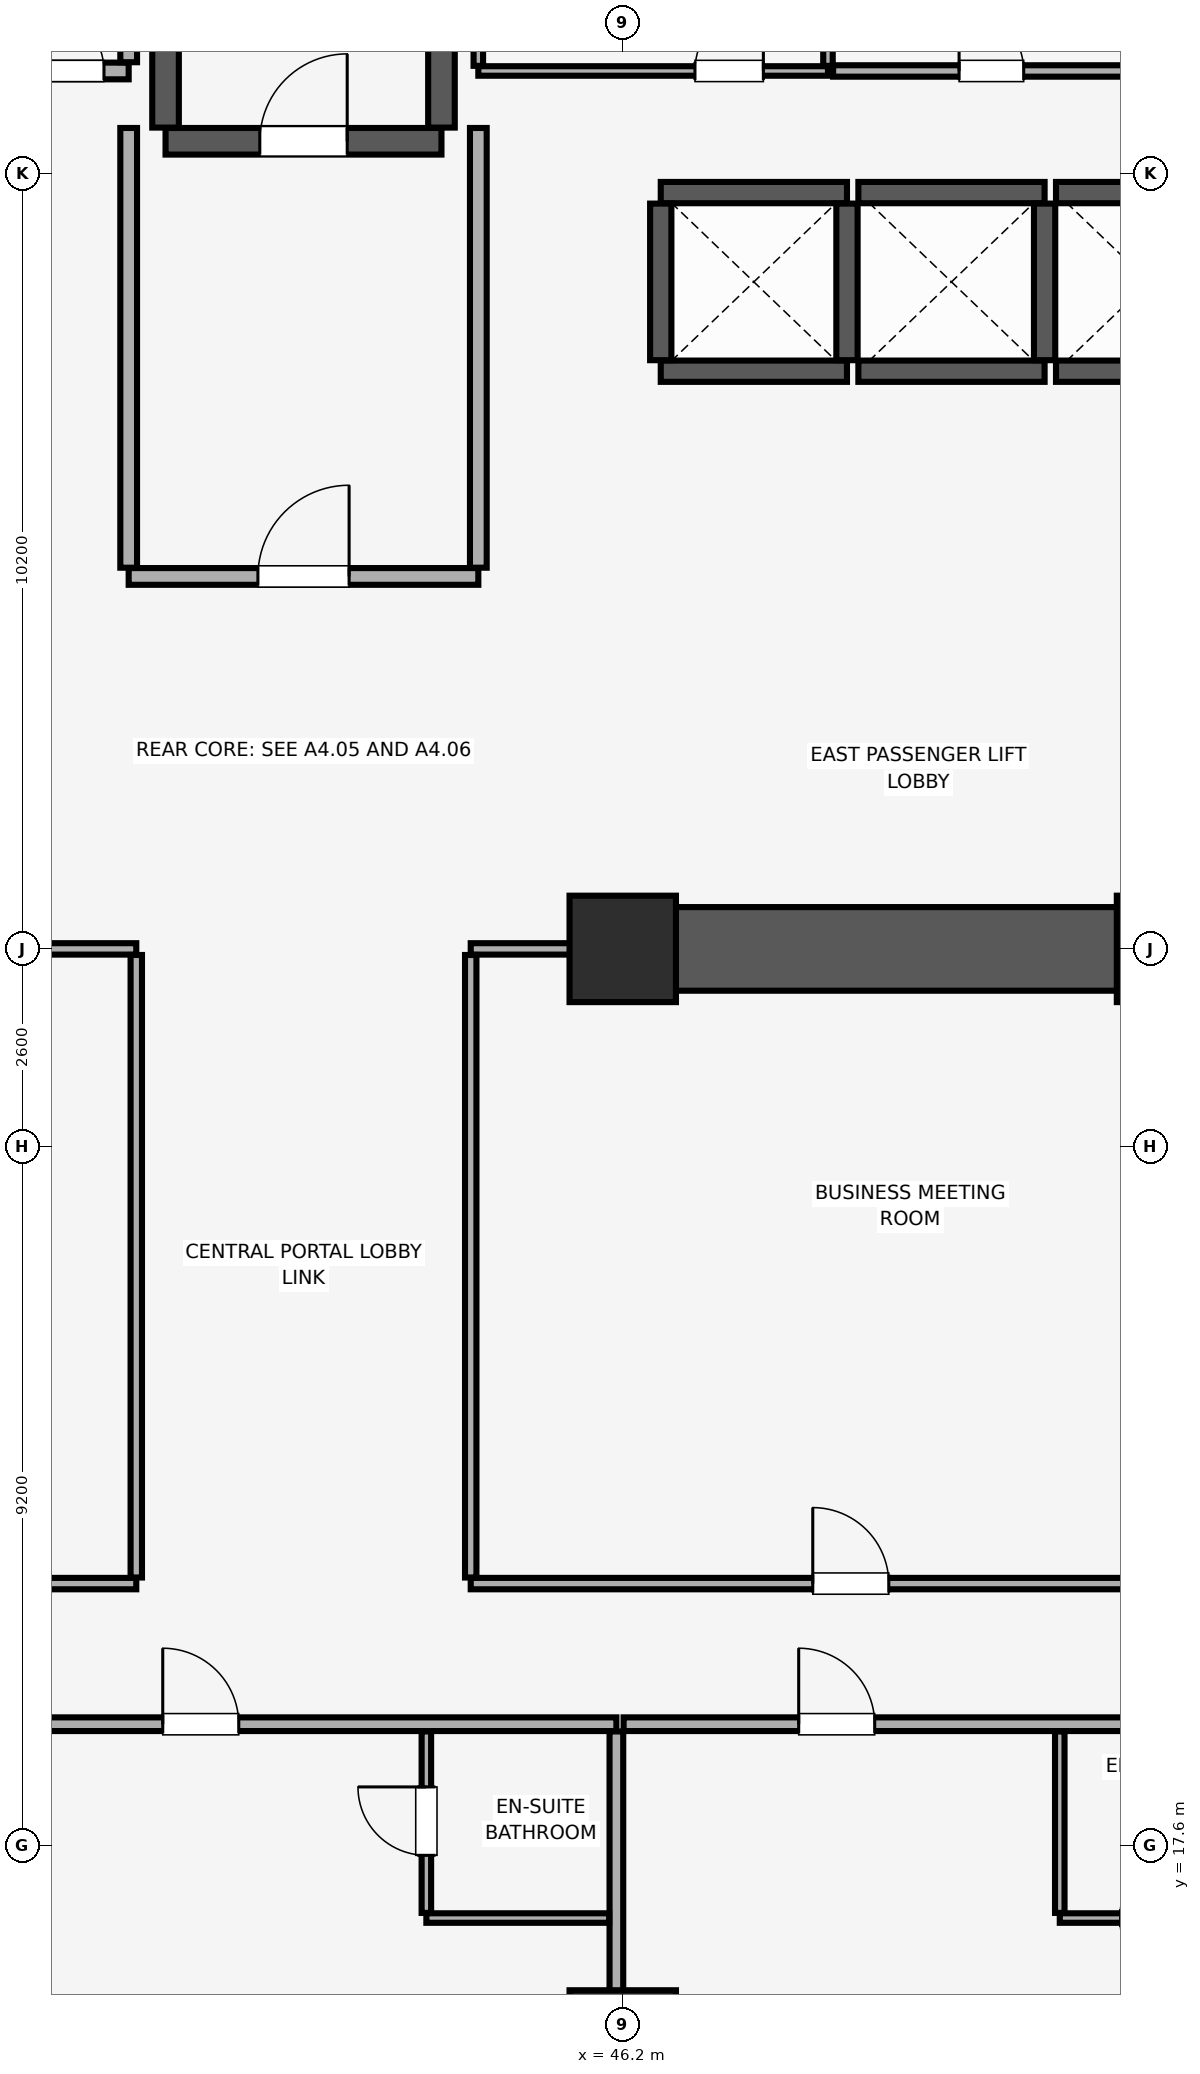
"""IFC4 building model, lengths in metres.
Left out: names, types, materials, properties, quantities, classifications, styles, units other than length and angle.
Written with IfcOpenShell. Run it as: python <this file> out.ifc"""

import sys

from ifc_helpers import new_model, si_unit, direction, frame, frame_2d, origin, origin_2d, place, context, subcontext, project, spatial, rectangle, extrude, element, fill, save


model = new_model("IFC4")
c1 = context("Model", 3, precision=1e-05, world=origin(), true_north=direction((0.0, 1.0)))
c2 = subcontext(c1, "Body", "Model", "MODEL_VIEW")
j1 = project(units=[si_unit("LENGTHUNIT", "METRE"), si_unit("PLANEANGLEUNIT", "RADIAN")], contexts=[c1])
p1 = place(None, origin())
s1 = spatial("IfcSite", under=j1, at=p1, CompositionType="ELEMENT")
p2 = place(p1, origin())
s2 = spatial("IfcBuilding", under=s1, at=p2, CompositionType="ELEMENT")
p3 = place(p2, frame((0.0, 0.0, 72.65)))
s3 = spatial("IfcBuildingStorey", under=s2, at=p3, CompositionType="ELEMENT", Elevation=72.65)
for number, where, z_axis, x_axis in (
    (1, (46.2, 15.0, 0.0), (0.0, 0.0, 1.0), (1.0, 0.0, 0.0)),
    (2, (46.2, 29.4, 0.0), (0.0, 0.0, 1.0), (1.0, 0.0, 0.0)),
    (3, (53.4, 29.4, 0.0), (0.0, 0.0, 1.0), (1.0, 0.0, 0.0)),
):
    element("IfcColumn", number, at=place(p3, frame(where, z_axis=z_axis, x_axis=x_axis)), inside=s3, PredefinedType="COLUMN", context=c2, shape_type="SweptSolid", body=[
        extrude(rectangle(XDim=1.4, YDim=1.4, at=origin_2d()), origin(), (0.0, 0.0, 1.0), 3.51),
    ])
p4 = place(p3, frame((46.0, 29.4, 0.0), z_axis=(0.0, 0.0, 1.0), x_axis=(1.0, 0.0, 0.0)))
e4 = element("IfcWall", 4, at=p4, inside=s3, PredefinedType="SHEAR", context=c2, shape_type="SweptSolid", body=[
    extrude(rectangle(XDim=7.6, YDim=1.1, at=frame_2d((3.8, 0.0))), origin(), (0.0, 0.0, 1.0), 3.51),
])
p5 = place(p3, frame((40.185, 40.025, 0.0), z_axis=(0.0, 0.0, 1.0), x_axis=(1.0, 0.0, 0.0)))
e5 = element("IfcWall", 5, at=p5, inside=s3, PredefinedType="SHEAR", context=c2, shape_type="SweptSolid", body=[
    extrude(rectangle(XDim=3.63, YDim=0.35, at=frame_2d((1.815, 0.0))), origin(), (0.0, 0.0, 1.0), 3.51),
])
p6 = place(p5, frame((1.24, 0.0, 0.0)))
e6 = element("IfcOpeningElement", 6, at=p6, cuts=e5, PredefinedType="OPENING", context=c2, shape_type="SweptSolid", body=[
    extrude(rectangle(XDim=1.15, YDim=2.15, at=frame_2d((0.575, 1.075))), frame((0.0, 0.185, 0.0), z_axis=(0.0, -1.0, 0.0), x_axis=(1.0, 0.0, 0.0)), (0.0, 0.0, 1.0), 0.37),
])
for number, where, z_axis, x_axis in (
    (7, (40.185, 40.205, 0.0), (0.0, 0.0, 1.0), (0.0, 1.0, 0.0)),
    (8, (43.815, 40.205, 0.0), (0.0, 0.0, 1.0), (0.0, 1.0, 0.0)),
):
    element("IfcWall", number, at=place(p3, frame(where, z_axis=z_axis, x_axis=x_axis)), inside=s3, PredefinedType="SHEAR", context=c2, shape_type="SweptSolid", body=[
        extrude(rectangle(XDim=8.09, YDim=0.35, at=frame_2d((4.045, 0.0))), origin(), (0.0, 0.0, 1.0), 3.51),
    ])
for number, where, z_axis, x_axis in (
    (9, (46.7, 37.0, 0.0), (0.0, 0.0, 1.0), (1.0, 0.0, 0.0)),
    (10, (46.7, 39.35, 0.0), (0.0, 0.0, 1.0), (1.0, 0.0, 0.0)),
):
    element("IfcWall", number, at=place(p3, frame(where, z_axis=z_axis, x_axis=x_axis)), inside=s3, PredefinedType="SHEAR", context=c2, shape_type="SweptSolid", body=[
        extrude(rectangle(XDim=2.45, YDim=0.28, at=frame_2d((1.225, 0.0))), origin(), (0.0, 0.0, 1.0), 3.51),
    ])
for number, where, z_axis, x_axis in (
    (11, (46.7, 37.145, 0.0), (0.0, 0.0, 1.0), (0.0, 1.0, 0.0)),
    (12, (49.15, 37.145, 0.0), (0.0, 0.0, 1.0), (0.0, 1.0, 0.0)),
):
    element("IfcWall", number, at=place(p3, frame(where, z_axis=z_axis, x_axis=x_axis)), inside=s3, PredefinedType="SHEAR", context=c2, shape_type="SweptSolid", body=[
        extrude(rectangle(XDim=2.06, YDim=0.28, at=frame_2d((1.03, 0.0))), origin(), (0.0, 0.0, 1.0), 3.51),
    ])
for number, where, z_axis, x_axis in (
    (13, (49.3, 37.0, 0.0), (0.0, 0.0, 1.0), (1.0, 0.0, 0.0)),
    (14, (49.3, 39.35, 0.0), (0.0, 0.0, 1.0), (1.0, 0.0, 0.0)),
):
    element("IfcWall", number, at=place(p3, frame(where, z_axis=z_axis, x_axis=x_axis)), inside=s3, PredefinedType="SHEAR", context=c2, shape_type="SweptSolid", body=[
        extrude(rectangle(XDim=2.45, YDim=0.28, at=frame_2d((1.225, 0.0))), origin(), (0.0, 0.0, 1.0), 3.51),
    ])
p7 = place(p3, frame((51.75, 37.145, 0.0), z_axis=(0.0, 0.0, 1.0), x_axis=(0.0, 1.0, 0.0)))
e15 = element("IfcWall", 15, at=p7, inside=s3, PredefinedType="SHEAR", context=c2, shape_type="SweptSolid", body=[
    extrude(rectangle(XDim=2.06, YDim=0.28, at=frame_2d((1.03, 0.0))), origin(), (0.0, 0.0, 1.0), 3.51),
])
for number, where, z_axis, x_axis in (
    (16, (51.9, 37.0, 0.0), (0.0, 0.0, 1.0), (1.0, 0.0, 0.0)),
    (17, (51.9, 39.35, 0.0), (0.0, 0.0, 1.0), (1.0, 0.0, 0.0)),
):
    element("IfcWall", number, at=place(p3, frame(where, z_axis=z_axis, x_axis=x_axis)), inside=s3, PredefinedType="SHEAR", context=c2, shape_type="SweptSolid", body=[
        extrude(rectangle(XDim=2.59, YDim=0.28, at=frame_2d((1.295, 0.0))), origin(), (0.0, 0.0, 1.0), 3.51),
    ])
p8 = place(p3, frame((39.7, 34.3, 0.0), z_axis=(0.0, 0.0, 1.0), x_axis=(1.0, 0.0, 0.0)))
e18 = element("IfcWall", 18, at=p8, inside=s3, PredefinedType="PARTITIONING", context=c2, shape_type="SweptSolid", body=[
    extrude(rectangle(XDim=4.6, YDim=0.22, at=frame_2d((2.3, 0.0))), origin(), (0.0, 0.0, 1.0), 3.51),
])
p9 = place(p8, frame((1.7, 0.0, 0.0)))
e19 = element("IfcOpeningElement", 19, at=p9, cuts=e18, PredefinedType="OPENING", context=c2, shape_type="SweptSolid", body=[
    extrude(rectangle(XDim=1.2, YDim=2.15, at=frame_2d((0.6, 1.075))), frame((0.0, 0.12, 0.0), z_axis=(0.0, -1.0, 0.0), x_axis=(1.0, 0.0, 0.0)), (0.0, 0.0, 1.0), 0.24),
])
for number, where, z_axis, x_axis in (
    (20, (39.7, 34.415, 0.0), (0.0, 0.0, 1.0), (0.0, 1.0, 0.0)),
    (21, (44.3, 34.415, 0.0), (0.0, 0.0, 1.0), (0.0, 1.0, 0.0)),
):
    element("IfcWall", number, at=place(p3, frame(where, z_axis=z_axis, x_axis=x_axis)), inside=s3, PredefinedType="PARTITIONING", context=c2, shape_type="SweptSolid", body=[
        extrude(rectangle(XDim=5.785, YDim=0.22, at=frame_2d((2.893, 0.0))), origin(), (0.0, 0.0, 1.0), 3.51),
    ])
p10 = place(p3, frame((36.28, 40.95, 0.0), z_axis=(0.0, 0.0, 1.0), x_axis=(1.0, 0.0, 0.0)))
e22 = element("IfcWall", 22, at=p10, inside=s3, PredefinedType="PARTITIONING", context=c2, shape_type="SweptSolid", body=[
    extrude(rectangle(XDim=3.42, YDim=0.22, at=frame_2d((1.71, 0.0))), origin(), (0.0, 0.0, 1.0), 3.51),
])
p11 = place(p10, frame((2.245, 0.0, 0.0)))
e23 = element("IfcOpeningElement", 23, at=p11, cuts=e22, PredefinedType="OPENING", context=c2, shape_type="SweptSolid", body=[
    extrude(rectangle(XDim=0.85, YDim=2.1, at=frame_2d((0.425, 1.05))), frame((0.0, 0.12, 0.0), z_axis=(0.0, -1.0, 0.0), x_axis=(1.0, 0.0, 0.0)), (0.0, 0.0, 1.0), 0.24),
])
p12 = place(p3, frame((39.7, 41.065, 0.0), z_axis=(0.0, 0.0, 1.0), x_axis=(0.0, 1.0, 0.0)))
e24 = element("IfcWall", 24, at=p12, inside=s3, PredefinedType="PARTITIONING", context=c2, shape_type="SweptSolid", body=[
    extrude(rectangle(XDim=7.785, YDim=0.22, at=frame_2d((3.893, 0.0))), origin(), (0.0, 0.0, 1.0), 3.51),
])
p13 = place(p3, frame((44.3, 40.95, 0.0), z_axis=(0.0, 0.0, 1.0), x_axis=(1.0, 0.0, 0.0)))
e25 = element("IfcWall", 25, at=p13, inside=s3, PredefinedType="PARTITIONING", context=c2, shape_type="SweptSolid", body=[
    extrude(rectangle(XDim=4.6, YDim=0.125, at=frame_2d((2.3, 0.0))), origin(), (0.0, 0.0, 1.0), 3.51),
])
p14 = place(p13, frame((2.85, 0.0, 0.0)))
e26 = element("IfcOpeningElement", 26, at=p14, cuts=e25, PredefinedType="OPENING", context=c2, shape_type="SweptSolid", body=[
    extrude(rectangle(XDim=0.9, YDim=2.1, at=frame_2d((0.45, 1.05))), frame((0.0, 0.073, 0.0), z_axis=(0.0, -1.0, 0.0), x_axis=(1.0, 0.0, 0.0)), (0.0, 0.0, 1.0), 0.145),
])
for number, where, z_axis, x_axis in (
    (27, (44.3, 41.018, 0.0), (0.0, 0.0, 1.0), (0.0, 1.0, 0.0)),
    (28, (48.9, 41.018, 0.0), (0.0, 0.0, 1.0), (0.0, 1.0, 0.0)),
):
    element("IfcWall", number, at=place(p3, frame(where, z_axis=z_axis, x_axis=x_axis)), inside=s3, PredefinedType="PARTITIONING", context=c2, shape_type="SweptSolid", body=[
        extrude(rectangle(XDim=3.515, YDim=0.125, at=frame_2d((1.757, 0.0))), origin(), (0.0, 0.0, 1.0), 3.51),
    ])
p15 = place(p3, frame((48.968, 40.95, 0.0), z_axis=(0.0, 0.0, 1.0), x_axis=(1.0, 0.0, 0.0)))
e29 = element("IfcWall", 29, at=p15, inside=s3, PredefinedType="PARTITIONING", context=c2, shape_type="SweptSolid", body=[
    extrude(rectangle(XDim=4.232, YDim=0.15, at=frame_2d((2.116, 0.0))), origin(), (0.0, 0.0, 1.0), 3.51),
])
p16 = place(p15, frame((1.657, 0.0, 0.0)))
e30 = element("IfcOpeningElement", 30, at=p16, cuts=e29, PredefinedType="OPENING", context=c2, shape_type="SweptSolid", body=[
    extrude(rectangle(XDim=0.85, YDim=2.1, at=frame_2d((0.425, 1.05))), frame((0.0, 0.085, 0.0), z_axis=(0.0, -1.0, 0.0), x_axis=(1.0, 0.0, 0.0)), (0.0, 0.0, 1.0), 0.17),
])
p17 = place(p3, frame((37.878, 19.2, 0.0), z_axis=(0.0, 0.0, 1.0), x_axis=(1.0, 0.0, 0.0)))
e31 = element("IfcWall", 31, at=p17, inside=s3, PredefinedType="PARTITIONING", context=c2, shape_type="SweptSolid", body=[
    extrude(rectangle(XDim=8.238, YDim=0.18, at=frame_2d((4.119, 0.0))), origin(), (0.0, 0.0, 1.0), 3.51),
])
p18 = place(p17, frame((2.27, 0.0, 0.0)))
e32 = element("IfcOpeningElement", 32, at=p18, cuts=e31, PredefinedType="OPENING", context=c2, shape_type="SweptSolid", body=[
    extrude(rectangle(XDim=1.0, YDim=2.15, at=frame_2d((0.5, 1.075))), frame((0.0, 0.1, 0.0), z_axis=(0.0, -1.0, 0.0), x_axis=(1.0, 0.0, 0.0)), (0.0, 0.0, 1.0), 0.2),
])
p19 = place(p3, frame((46.116, 0.15, 0.0), z_axis=(0.0, 0.0, 1.0), x_axis=(0.0, 1.0, 0.0)))
e33 = element("IfcWall", 33, at=p19, inside=s3, PredefinedType="PARTITIONING", context=c2, shape_type="SweptSolid", body=[
    extrude(rectangle(XDim=18.955, YDim=0.18, at=frame_2d((9.478, 0.0))), origin(), (0.0, 0.0, 1.0), 2.898),
])
p20 = place(p3, frame((43.616, 16.65, 0.0), z_axis=(0.0, 0.0, 1.0), x_axis=(1.0, 0.0, 0.0)))
e34 = element("IfcWall", 34, at=p20, inside=s3, PredefinedType="PARTITIONING", context=c2, shape_type="SweptSolid", body=[
    extrude(rectangle(XDim=2.405, YDim=0.125, at=frame_2d((1.203, 0.0))), origin(), (0.0, 0.0, 1.0), 3.51),
])
p21 = place(p3, frame((43.616, 16.718, 0.0), z_axis=(0.0, 0.0, 1.0), x_axis=(0.0, 1.0, 0.0)))
e35 = element("IfcWall", 35, at=p21, inside=s3, PredefinedType="PARTITIONING", context=c2, shape_type="SweptSolid", body=[
    extrude(rectangle(XDim=2.387, YDim=0.125, at=frame_2d((1.194, 0.0))), origin(), (0.0, 0.0, 1.0), 3.51),
])
p22 = place(p21, frame((0.758, 0.0, 0.0)))
e36 = element("IfcOpeningElement", 36, at=p22, cuts=e35, PredefinedType="OPENING", context=c2, shape_type="SweptSolid", body=[
    extrude(rectangle(XDim=0.9, YDim=2.1, at=frame_2d((0.45, 1.05))), frame((0.0, 0.073, 0.0), z_axis=(0.0, -1.0, 0.0), x_axis=(1.0, 0.0, 0.0)), (0.0, 0.0, 1.0), 0.145),
])
p23 = place(p3, frame((46.211, 19.2, 0.0), z_axis=(0.0, 0.0, 1.0), x_axis=(1.0, 0.0, 0.0)))
e37 = element("IfcWall", 37, at=p23, inside=s3, PredefinedType="PARTITIONING", context=c2, shape_type="SweptSolid", body=[
    extrude(rectangle(XDim=8.238, YDim=0.18, at=frame_2d((4.119, 0.0))), origin(), (0.0, 0.0, 1.0), 3.51),
])
p24 = place(p23, frame((2.303, 0.0, 0.0)))
e38 = element("IfcOpeningElement", 38, at=p24, cuts=e37, PredefinedType="OPENING", context=c2, shape_type="SweptSolid", body=[
    extrude(rectangle(XDim=1.0, YDim=2.15, at=frame_2d((0.5, 1.075))), frame((0.0, 0.1, 0.0), z_axis=(0.0, -1.0, 0.0), x_axis=(1.0, 0.0, 0.0)), (0.0, 0.0, 1.0), 0.2),
])
p25 = place(p3, frame((51.95, 16.65, 0.0), z_axis=(0.0, 0.0, 1.0), x_axis=(1.0, 0.0, 0.0)))
e39 = element("IfcWall", 39, at=p25, inside=s3, PredefinedType="PARTITIONING", context=c2, shape_type="SweptSolid", body=[
    extrude(rectangle(XDim=2.405, YDim=0.125, at=frame_2d((1.203, 0.0))), origin(), (0.0, 0.0, 1.0), 3.51),
])
p26 = place(p25, frame((0.8, 0.0, 0.0)))
e40 = element("IfcOpeningElement", 40, at=p26, cuts=e39, PredefinedType="OPENING", context=c2, shape_type="SweptSolid", body=[
    extrude(rectangle(XDim=0.9, YDim=2.1, at=frame_2d((0.45, 1.05))), frame((0.0, 0.073, 0.0), z_axis=(0.0, -1.0, 0.0), x_axis=(1.0, 0.0, 0.0)), (0.0, 0.0, 1.0), 0.145),
])
p27 = place(p3, frame((51.95, 16.718, 0.0), z_axis=(0.0, 0.0, 1.0), x_axis=(0.0, 1.0, 0.0)))
e41 = element("IfcWall", 41, at=p27, inside=s3, PredefinedType="PARTITIONING", context=c2, shape_type="SweptSolid", body=[
    extrude(rectangle(XDim=2.387, YDim=0.125, at=frame_2d((1.194, 0.0))), origin(), (0.0, 0.0, 1.0), 3.51),
])
p28 = place(p3, frame((25.28, 21.05, 0.0), z_axis=(0.0, 0.0, 1.0), x_axis=(1.0, 0.0, 0.0)))
e42 = element("IfcWall", 42, at=p28, inside=s3, PredefinedType="PARTITIONING", context=c2, shape_type="SweptSolid", body=[
    extrude(rectangle(XDim=14.52, YDim=0.15, at=frame_2d((7.26, 0.0))), origin(), (0.0, 0.0, 1.0), 3.51),
])
p29 = place(p28, frame((6.72, 0.0, 0.0)))
e43 = element("IfcOpeningElement", 43, at=p29, cuts=e42, PredefinedType="OPENING", context=c2, shape_type="SweptSolid", body=[
    extrude(rectangle(XDim=1.0, YDim=2.15, at=frame_2d((0.5, 1.075))), frame((0.0, 0.085, 0.0), z_axis=(0.0, -1.0, 0.0), x_axis=(1.0, 0.0, 0.0)), (0.0, 0.0, 1.0), 0.17),
])
p30 = place(p3, frame((38.01, 29.4, 0.0), z_axis=(0.0, 0.0, 1.0), x_axis=(1.0, 0.0, 0.0)))
e44 = element("IfcWall", 44, at=p30, inside=s3, PredefinedType="PARTITIONING", context=c2, shape_type="SweptSolid", body=[
    extrude(rectangle(XDim=1.79, YDim=0.15, at=frame_2d((0.895, 0.0))), origin(), (0.0, 0.0, 1.0), 2.41),
])
p31 = place(p3, frame((39.8, 21.13, 0.0), z_axis=(0.0, 0.0, 1.0), x_axis=(0.0, 1.0, 0.0)))
e45 = element("IfcWall", 45, at=p31, inside=s3, PredefinedType="PARTITIONING", context=c2, shape_type="SweptSolid", body=[
    extrude(rectangle(XDim=8.19, YDim=0.15, at=frame_2d((4.095, 0.0))), origin(), (0.0, 0.0, 1.0), 3.51),
])
p32 = place(p3, frame((44.2, 21.05, 0.0), z_axis=(0.0, 0.0, 1.0), x_axis=(1.0, 0.0, 0.0)))
e46 = element("IfcWall", 46, at=p32, inside=s3, PredefinedType="PARTITIONING", context=c2, shape_type="SweptSolid", body=[
    extrude(rectangle(XDim=10.0, YDim=0.15, at=frame_2d((5.0, 0.0))), origin(), (0.0, 0.0, 1.0), 3.51),
])
p33 = place(p32, frame((4.5, 0.0, 0.0)))
e47 = element("IfcOpeningElement", 47, at=p33, cuts=e46, PredefinedType="OPENING", context=c2, shape_type="SweptSolid", body=[
    extrude(rectangle(XDim=1.0, YDim=2.15, at=frame_2d((0.5, 1.075))), frame((0.0, 0.085, 0.0), z_axis=(0.0, -1.0, 0.0), x_axis=(1.0, 0.0, 0.0)), (0.0, 0.0, 1.0), 0.17),
])
p34 = place(p3, frame((44.2, 29.4, 0.0), z_axis=(0.0, 0.0, 1.0), x_axis=(1.0, 0.0, 0.0)))
e48 = element("IfcWall", 48, at=p34, inside=s3, PredefinedType="PARTITIONING", context=c2, shape_type="SweptSolid", body=[
    extrude(rectangle(XDim=1.79, YDim=0.15, at=frame_2d((0.895, 0.0))), origin(), (0.0, 0.0, 1.0), 2.41),
])
p35 = place(p3, frame((44.2, 21.13, 0.0), z_axis=(0.0, 0.0, 1.0), x_axis=(0.0, 1.0, 0.0)))
e49 = element("IfcWall", 49, at=p35, inside=s3, PredefinedType="PARTITIONING", context=c2, shape_type="SweptSolid", body=[
    extrude(rectangle(XDim=8.19, YDim=0.15, at=frame_2d((4.095, 0.0))), origin(), (0.0, 0.0, 1.0), 3.51),
])
p36 = place(p6, origin())
e50 = element("IfcDoor", 50, at=p36, inside=s3, OperationType="SINGLE_SWING_RIGHT", PredefinedType="DOOR", context=c2, shape_type="SweptSolid", body=[
    extrude(rectangle(XDim=1.15, YDim=2.15, at=frame_2d((0.575, 1.075))), frame((0.0, 0.025, 0.0), z_axis=(0.0, -1.0, 0.0), x_axis=(1.0, 0.0, 0.0)), (0.0, 0.0, 1.0), 0.05),
])
fill(e6, e50)
p37 = place(p9, origin())
e51 = element("IfcDoor", 51, at=p37, inside=s3, OperationType="SINGLE_SWING_RIGHT", PredefinedType="DOOR", context=c2, shape_type="SweptSolid", body=[
    extrude(rectangle(XDim=1.2, YDim=2.15, at=frame_2d((0.6, 1.075))), frame((0.0, 0.025, 0.0), z_axis=(0.0, -1.0, 0.0), x_axis=(1.0, 0.0, 0.0)), (0.0, 0.0, 1.0), 0.05),
])
fill(e19, e51)
p38 = place(p11, origin())
e52 = element("IfcDoor", 52, at=p38, inside=s3, OperationType="SINGLE_SWING_LEFT", PredefinedType="DOOR", context=c2, shape_type="SweptSolid", body=[
    extrude(rectangle(XDim=0.85, YDim=2.1, at=frame_2d((0.425, 1.05))), frame((0.0, 0.025, 0.0), z_axis=(0.0, -1.0, 0.0), x_axis=(1.0, 0.0, 0.0)), (0.0, 0.0, 1.0), 0.05),
])
fill(e23, e52)
p39 = place(p14, origin())
e53 = element("IfcDoor", 53, at=p39, inside=s3, OperationType="SINGLE_SWING_RIGHT", PredefinedType="DOOR", context=c2, shape_type="SweptSolid", body=[
    extrude(rectangle(XDim=0.9, YDim=2.1, at=frame_2d((0.45, 1.05))), frame((0.0, 0.025, 0.0), z_axis=(0.0, -1.0, 0.0), x_axis=(1.0, 0.0, 0.0)), (0.0, 0.0, 1.0), 0.05),
])
fill(e26, e53)
p40 = place(p16, origin())
e54 = element("IfcDoor", 54, at=p40, inside=s3, OperationType="SINGLE_SWING_LEFT", PredefinedType="DOOR", context=c2, shape_type="SweptSolid", body=[
    extrude(rectangle(XDim=0.85, YDim=2.1, at=frame_2d((0.425, 1.05))), frame((0.0, 0.025, 0.0), z_axis=(0.0, -1.0, 0.0), x_axis=(1.0, 0.0, 0.0)), (0.0, 0.0, 1.0), 0.05),
])
fill(e30, e54)
p41 = place(p18, origin())
e55 = element("IfcDoor", 55, at=p41, inside=s3, OperationType="SINGLE_SWING_LEFT", PredefinedType="DOOR", context=c2, shape_type="SweptSolid", body=[
    extrude(rectangle(XDim=1.0, YDim=2.15, at=frame_2d((0.5, 1.075))), frame((0.0, 0.025, 0.0), z_axis=(0.0, -1.0, 0.0), x_axis=(1.0, 0.0, 0.0)), (0.0, 0.0, 1.0), 0.05),
])
fill(e32, e55)
p42 = place(p22, origin())
e56 = element("IfcDoor", 56, at=p42, inside=s3, OperationType="SINGLE_SWING_RIGHT", PredefinedType="DOOR", context=c2, shape_type="SweptSolid", body=[
    extrude(rectangle(XDim=0.9, YDim=2.1, at=frame_2d((0.45, 1.05))), frame((0.0, 0.025, 0.0), z_axis=(0.0, -1.0, 0.0), x_axis=(1.0, 0.0, 0.0)), (0.0, 0.0, 1.0), 0.05),
])
fill(e36, e56)
p43 = place(p24, origin())
e57 = element("IfcDoor", 57, at=p43, inside=s3, OperationType="SINGLE_SWING_LEFT", PredefinedType="DOOR", context=c2, shape_type="SweptSolid", body=[
    extrude(rectangle(XDim=1.0, YDim=2.15, at=frame_2d((0.5, 1.075))), frame((0.0, 0.025, 0.0), z_axis=(0.0, -1.0, 0.0), x_axis=(1.0, 0.0, 0.0)), (0.0, 0.0, 1.0), 0.05),
])
fill(e38, e57)
p44 = place(p26, origin())
e58 = element("IfcDoor", 58, at=p44, inside=s3, OperationType="SINGLE_SWING_RIGHT", PredefinedType="DOOR", context=c2, shape_type="SweptSolid", body=[
    extrude(rectangle(XDim=0.9, YDim=2.1, at=frame_2d((0.45, 1.05))), frame((0.0, 0.025, 0.0), z_axis=(0.0, -1.0, 0.0), x_axis=(1.0, 0.0, 0.0)), (0.0, 0.0, 1.0), 0.05),
])
fill(e40, e58)
p45 = place(p33, origin())
e59 = element("IfcDoor", 59, at=p45, inside=s3, OperationType="SINGLE_SWING_LEFT", PredefinedType="DOOR", context=c2, shape_type="SweptSolid", body=[
    extrude(rectangle(XDim=1.0, YDim=2.15, at=frame_2d((0.5, 1.075))), frame((0.0, 0.025, 0.0), z_axis=(0.0, -1.0, 0.0), x_axis=(1.0, 0.0, 0.0)), (0.0, 0.0, 1.0), 0.05),
])
fill(e47, e59)
save(model, sys.argv[1])
